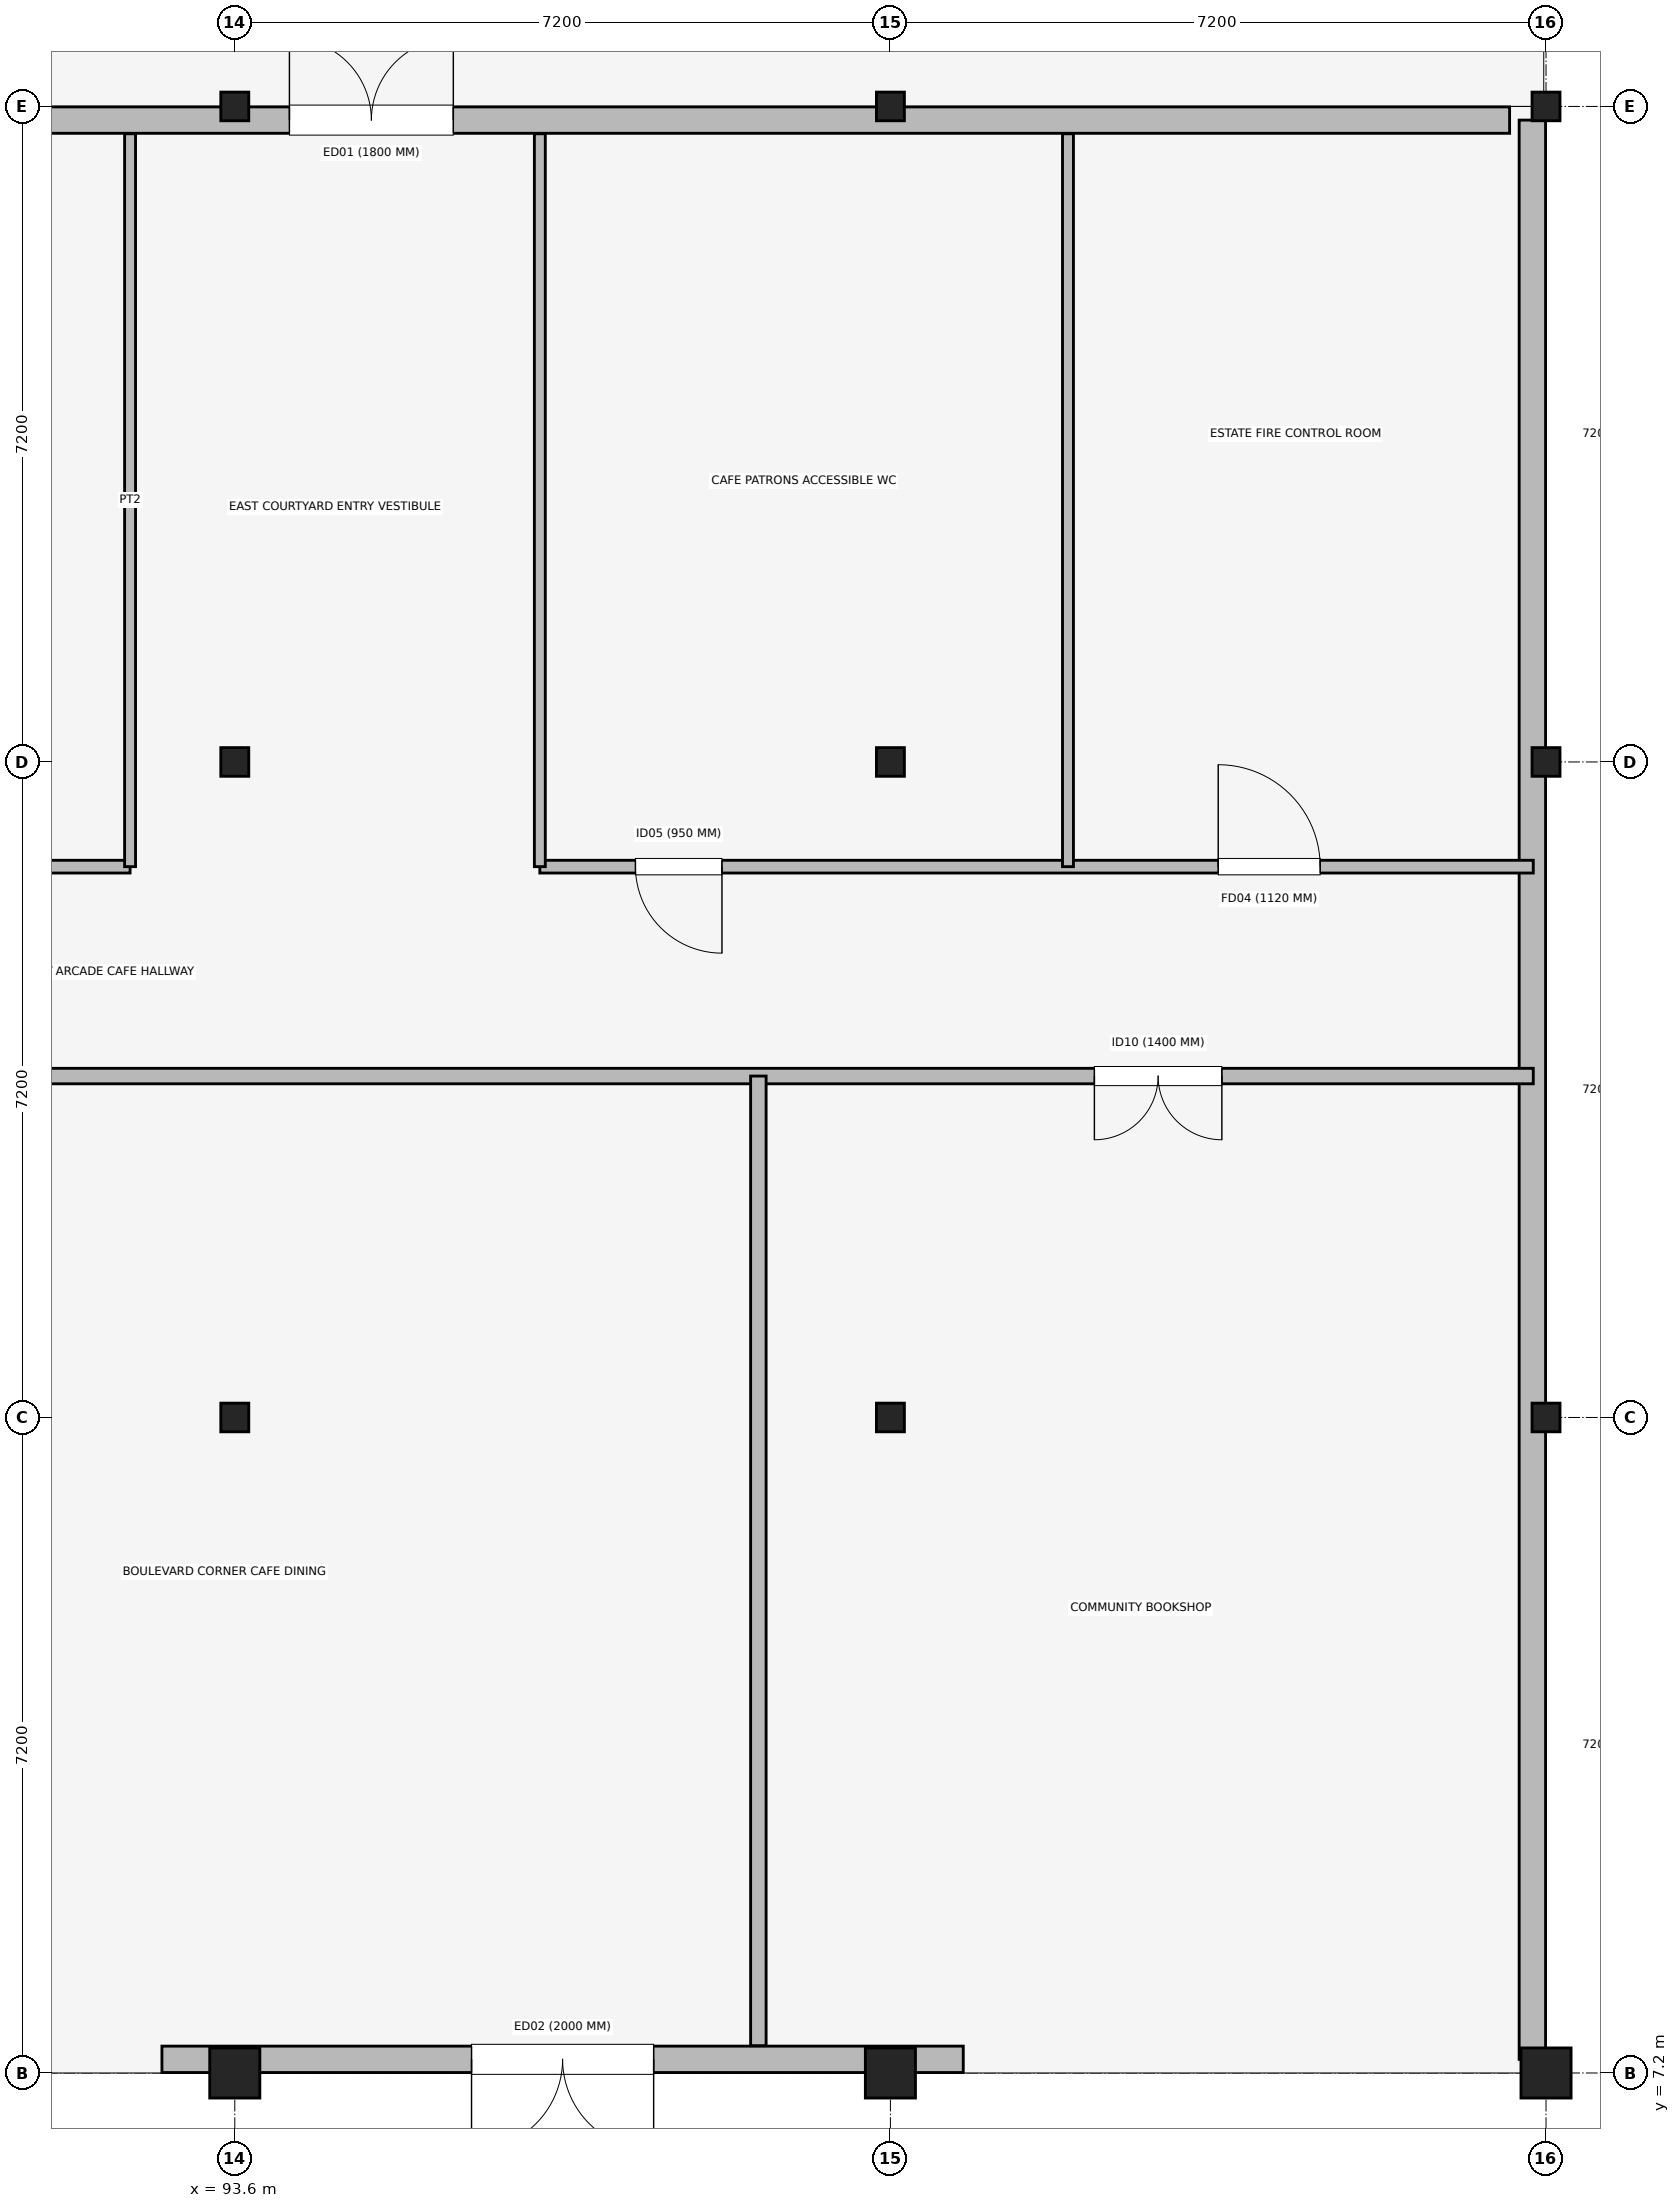
"""IFC4 building model, lengths in metres.
Left out: names, types, materials, properties, quantities, classifications, styles, units other than length and angle.
Written with IfcOpenShell. Run it as: python <this file> out.ifc"""

import sys

from ifc_helpers import new_model, si_unit, direction, frame, frame_2d, origin, origin_2d, place, context, subcontext, project, spatial, rectangle, circle, i_section, extrude, element, fill, save


model = new_model("IFC4")
c1 = context("Model", 3, precision=1e-05, world=origin(), true_north=direction((0.0, 1.0)))
c2 = subcontext(c1, "Body", "Model", "MODEL_VIEW")
j1 = project(units=[si_unit("LENGTHUNIT", "METRE"), si_unit("PLANEANGLEUNIT", "RADIAN")], contexts=[c1])
p1 = place(None, origin())
s1 = spatial("IfcSite", under=j1, at=p1, CompositionType="ELEMENT")
p2 = place(p1, origin())
s2 = spatial("IfcBuilding", under=s1, at=p2, CompositionType="ELEMENT")
p3 = place(p2, origin())
s3 = spatial("IfcBuildingStorey", under=s2, at=p3, CompositionType="ELEMENT", Elevation=0.0)
p4 = place(p3, frame((93.6, 7.2, 0.0), z_axis=(0.0, 0.0, 1.0), x_axis=(1.0, 0.0, 0.0)))
e1 = element("IfcColumn", 1, at=p4, inside=s3, PredefinedType="COLUMN", context=c2, shape_type="SweptSolid", body=[
    extrude(circle(Radius=0.275, at=origin_2d()), origin(), (0.0, 0.0, 1.0), 4.5),
])
for number, where, z_axis, x_axis in (
    (2, (93.6, 14.4, 0.0), (0.0, 0.0, 1.0), (1.0, 0.0, 0.0)),
    (3, (93.6, 21.6, 0.0), (0.0, 0.0, 1.0), (1.0, 0.0, 0.0)),
    (4, (93.6, 28.8, 0.0), (0.0, 0.0, 1.0), (1.0, 0.0, 0.0)),
):
    element("IfcColumn", number, at=place(p3, frame(where, z_axis=z_axis, x_axis=x_axis)), inside=s3, PredefinedType="COLUMN", context=c2, shape_type="SweptSolid", body=[
        extrude(i_section(OverallWidth=0.307, OverallDepth=0.315, WebThickness=0.012, FlangeThickness=0.019, FilletRadius=0.017, at=origin_2d()), origin(), (0.0, 0.0, 1.0), 4.5),
    ])
p5 = place(p3, frame((100.8, 7.2, 0.0), z_axis=(0.0, 0.0, 1.0), x_axis=(1.0, 0.0, 0.0)))
e5 = element("IfcColumn", 5, at=p5, inside=s3, PredefinedType="COLUMN", context=c2, shape_type="SweptSolid", body=[
    extrude(circle(Radius=0.275, at=origin_2d()), origin(), (0.0, 0.0, 1.0), 4.5),
])
for number, where, z_axis, x_axis in (
    (6, (100.8, 14.4, 0.0), (0.0, 0.0, 1.0), (1.0, 0.0, 0.0)),
    (7, (100.8, 21.6, 0.0), (0.0, 0.0, 1.0), (1.0, 0.0, 0.0)),
    (8, (100.8, 28.8, 0.0), (0.0, 0.0, 1.0), (1.0, 0.0, 0.0)),
):
    element("IfcColumn", number, at=place(p3, frame(where, z_axis=z_axis, x_axis=x_axis)), inside=s3, PredefinedType="COLUMN", context=c2, shape_type="SweptSolid", body=[
        extrude(i_section(OverallWidth=0.307, OverallDepth=0.315, WebThickness=0.012, FlangeThickness=0.019, FilletRadius=0.017, at=origin_2d()), origin(), (0.0, 0.0, 1.0), 4.5),
    ])
p6 = place(p3, frame((108.0, 7.2, 0.0), z_axis=(0.0, 0.0, 1.0), x_axis=(1.0, 0.0, 0.0)))
e9 = element("IfcColumn", 9, at=p6, inside=s3, PredefinedType="COLUMN", context=c2, shape_type="SweptSolid", body=[
    extrude(circle(Radius=0.275, at=origin_2d()), origin(), (0.0, 0.0, 1.0), 4.5),
])
for number, where, z_axis, x_axis in (
    (10, (108.0, 14.4, 0.0), (0.0, 0.0, 1.0), (1.0, 0.0, 0.0)),
    (11, (108.0, 21.6, 0.0), (0.0, 0.0, 1.0), (1.0, 0.0, 0.0)),
    (12, (108.0, 28.8, 0.0), (0.0, 0.0, 1.0), (1.0, 0.0, 0.0)),
):
    element("IfcColumn", number, at=place(p3, frame(where, z_axis=z_axis, x_axis=x_axis)), inside=s3, PredefinedType="COLUMN", context=c2, shape_type="SweptSolid", body=[
        extrude(i_section(OverallWidth=0.307, OverallDepth=0.315, WebThickness=0.012, FlangeThickness=0.019, FilletRadius=0.017, at=origin_2d()), origin(), (0.0, 0.0, 1.0), 4.5),
    ])
p7 = place(p3, frame((92.8, 7.35, 0.0), z_axis=(0.0, 0.0, 1.0), x_axis=(1.0, 0.0, 0.0)))
e13 = element("IfcWall", 13, at=p7, inside=s3, PredefinedType="SOLIDWALL", context=c2, shape_type="SweptSolid", body=[
    extrude(rectangle(XDim=8.8, YDim=0.29, at=frame_2d((4.4, 0.0))), origin(), (0.0, 0.0, 1.0), 2.752),
])
p8 = place(p7, frame((5.4, 0.0, 0.0), z_axis=(0.0, 0.0, 1.0), x_axis=(-1.0, 0.0, 0.0)))
e14 = element("IfcOpeningElement", 14, at=p8, cuts=e13, PredefinedType="OPENING", context=c2, shape_type="SweptSolid", body=[
    extrude(rectangle(XDim=2.0, YDim=2.5, at=frame_2d((1.0, 1.25))), frame((0.0, 0.155, 0.0), z_axis=(0.0, -1.0, 0.0), x_axis=(1.0, 0.0, 0.0)), (0.0, 0.0, 1.0), 0.31),
])
p9 = place(p3, frame((86.8, 28.65, 0.0), z_axis=(0.0, 0.0, 1.0), x_axis=(1.0, 0.0, 0.0)))
e15 = element("IfcWall", 15, at=p9, inside=s3, PredefinedType="SOLIDWALL", context=c2, shape_type="SweptSolid", body=[
    extrude(rectangle(XDim=20.8, YDim=0.29, at=frame_2d((10.4, 0.0))), origin(), (0.0, 0.0, 1.0), 3.701),
])
p10 = place(p9, frame((7.4, 0.0, 0.0)))
e16 = element("IfcOpeningElement", 16, at=p10, cuts=e15, PredefinedType="OPENING", context=c2, shape_type="SweptSolid", body=[
    extrude(rectangle(XDim=1.8, YDim=2.4, at=frame_2d((0.9, 1.2))), frame((0.0, 0.155, 0.0), z_axis=(0.0, -1.0, 0.0), x_axis=(1.0, 0.0, 0.0)), (0.0, 0.0, 1.0), 0.31),
])
p11 = place(p3, frame((107.85, 7.35, 0.0), z_axis=(0.0, 0.0, 1.0), x_axis=(0.0, 1.0, 0.0)))
e17 = element("IfcWall", 17, at=p11, inside=s3, PredefinedType="SOLIDWALL", context=c2, shape_type="SweptSolid", body=[
    extrude(rectangle(XDim=21.3, YDim=0.29, at=frame_2d((10.65, 0.0))), origin(), (0.0, 0.0, 1.0), 2.752),
])
p12 = place(p3, frame((86.54, 18.15, 0.0), z_axis=(0.0, 0.0, 1.0), x_axis=(1.0, 0.0, 0.0)))
e18 = element("IfcWall", 18, at=p12, inside=s3, PredefinedType="PARTITIONING", context=c2, shape_type="SweptSolid", body=[
    extrude(rectangle(XDim=21.32, YDim=0.17, at=frame_2d((10.66, 0.0))), origin(), (0.0, 0.0, 1.0), 3.5),
])
p13 = place(p12, frame((3.9, 0.0, 0.0), z_axis=(0.0, 0.0, 1.0), x_axis=(-1.0, 0.0, 0.0)))
e19 = element("IfcOpeningElement", 19, at=p13, cuts=e18, PredefinedType="OPENING", context=c2, shape_type="SweptSolid", body=[
    extrude(rectangle(XDim=1.5, YDim=2.28, at=frame_2d((0.75, 1.14))), frame((0.0, 0.095, 0.0), z_axis=(0.0, -1.0, 0.0), x_axis=(1.0, 0.0, 0.0)), (0.0, 0.0, 1.0), 0.19),
])
p14 = place(p12, frame((17.9, 0.0, 0.0), z_axis=(0.0, 0.0, 1.0), x_axis=(-1.0, 0.0, 0.0)))
e20 = element("IfcOpeningElement", 20, at=p14, cuts=e18, PredefinedType="OPENING", context=c2, shape_type="SweptSolid", body=[
    extrude(rectangle(XDim=1.4, YDim=2.22, at=frame_2d((0.7, 1.11))), frame((0.0, 0.095, 0.0), z_axis=(0.0, -1.0, 0.0), x_axis=(1.0, 0.0, 0.0)), (0.0, 0.0, 1.0), 0.19),
])
p15 = place(p3, frame((99.35, 7.5, 0.0), z_axis=(0.0, 0.0, 1.0), x_axis=(0.0, 1.0, 0.0)))
e21 = element("IfcWall", 21, at=p15, inside=s3, PredefinedType="PARTITIONING", context=c2, shape_type="SweptSolid", body=[
    extrude(rectangle(XDim=10.65, YDim=0.17, at=frame_2d((5.325, 0.0))), origin(), (0.0, 0.0, 1.0), 3.5),
])
p16 = place(p3, frame((86.54, 20.45, 0.0), z_axis=(0.0, 0.0, 1.0), x_axis=(1.0, 0.0, 0.0)))
e22 = element("IfcWall", 22, at=p16, inside=s3, PredefinedType="PARTITIONING", context=c2, shape_type="SweptSolid", body=[
    extrude(rectangle(XDim=5.91, YDim=0.14, at=frame_2d((2.955, 0.0))), origin(), (0.0, 0.0, 1.0), 3.5),
])
p17 = place(p16, frame((2.1, 0.0, 0.0)))
e23 = element("IfcOpeningElement", 23, at=p17, cuts=e22, PredefinedType="OPENING", context=c2, shape_type="SweptSolid", body=[
    extrude(rectangle(XDim=1.1, YDim=2.15, at=frame_2d((0.55, 1.075))), frame((0.0, 0.08, 0.0), z_axis=(0.0, -1.0, 0.0), x_axis=(1.0, 0.0, 0.0)), (0.0, 0.0, 1.0), 0.16),
])
p18 = place(p3, frame((96.95, 20.45, 0.0), z_axis=(0.0, 0.0, 1.0), x_axis=(1.0, 0.0, 0.0)))
e24 = element("IfcWall", 24, at=p18, inside=s3, PredefinedType="PARTITIONING", context=c2, shape_type="SweptSolid", body=[
    extrude(rectangle(XDim=10.91, YDim=0.14, at=frame_2d((5.455, 0.0))), origin(), (0.0, 0.0, 1.0), 3.5),
])
p19 = place(p18, frame((2.0, 0.0, 0.0), z_axis=(0.0, 0.0, 1.0), x_axis=(-1.0, 0.0, 0.0)))
e25 = element("IfcOpeningElement", 25, at=p19, cuts=e24, PredefinedType="OPENING", context=c2, shape_type="SweptSolid", body=[
    extrude(rectangle(XDim=0.95, YDim=2.12, at=frame_2d((0.475, 1.06))), frame((0.0, 0.08, 0.0), z_axis=(0.0, -1.0, 0.0), x_axis=(1.0, 0.0, 0.0)), (0.0, 0.0, 1.0), 0.16),
])
p20 = place(p18, frame((7.45, 0.0, 0.0)))
e26 = element("IfcOpeningElement", 26, at=p20, cuts=e24, PredefinedType="OPENING", context=c2, shape_type="SweptSolid", body=[
    extrude(rectangle(XDim=1.12, YDim=2.15, at=frame_2d((0.56, 1.075))), frame((0.0, 0.08, 0.0), z_axis=(0.0, -1.0, 0.0), x_axis=(1.0, 0.0, 0.0)), (0.0, 0.0, 1.0), 0.16),
])
for number, where, z_axis, x_axis in (
    (27, (92.45, 20.45, 0.0), (0.0, 0.0, 1.0), (0.0, 1.0, 0.0)),
    (28, (96.95, 20.45, 0.0), (0.0, 0.0, 1.0), (0.0, 1.0, 0.0)),
    (29, (102.75, 20.45, 0.0), (0.0, 0.0, 1.0), (0.0, 1.0, 0.0)),
):
    element("IfcWall", number, at=place(p3, frame(where, z_axis=z_axis, x_axis=x_axis)), inside=s3, PredefinedType="PARTITIONING", context=c2, shape_type="SweptSolid", body=[
        extrude(rectangle(XDim=8.05, YDim=0.12, at=frame_2d((4.025, 0.0))), origin(), (0.0, 0.0, 1.0), 3.5),
    ])
p21 = place(p8, origin())
e30 = element("IfcDoor", 30, at=p21, inside=s3, OperationType="DOUBLE_DOOR_SINGLE_SWING", PredefinedType="DOOR", context=c2, shape_type="SweptSolid", body=[
    extrude(rectangle(XDim=2.0, YDim=2.5, at=frame_2d((1.0, 1.25))), frame((0.0, 0.025, 0.0), z_axis=(0.0, -1.0, 0.0), x_axis=(1.0, 0.0, 0.0)), (0.0, 0.0, 1.0), 0.05),
])
fill(e14, e30)
p22 = place(p10, origin())
e31 = element("IfcDoor", 31, at=p22, inside=s3, OperationType="DOUBLE_DOOR_SINGLE_SWING", PredefinedType="DOOR", context=c2, shape_type="SweptSolid", body=[
    extrude(rectangle(XDim=1.8, YDim=2.4, at=frame_2d((0.9, 1.2))), frame((0.0, 0.025, 0.0), z_axis=(0.0, -1.0, 0.0), x_axis=(1.0, 0.0, 0.0)), (0.0, 0.0, 1.0), 0.05),
])
fill(e16, e31)
p23 = place(p14, origin())
e32 = element("IfcDoor", 32, at=p23, inside=s3, OperationType="DOUBLE_DOOR_SINGLE_SWING", PredefinedType="DOOR", context=c2, shape_type="SweptSolid", body=[
    extrude(rectangle(XDim=1.4, YDim=2.22, at=frame_2d((0.7, 1.11))), frame((0.0, 0.025, 0.0), z_axis=(0.0, -1.0, 0.0), x_axis=(1.0, 0.0, 0.0)), (0.0, 0.0, 1.0), 0.05),
])
fill(e20, e32)
p24 = place(p19, origin())
e33 = element("IfcDoor", 33, at=p24, inside=s3, OperationType="SINGLE_SWING_RIGHT", PredefinedType="DOOR", context=c2, shape_type="SweptSolid", body=[
    extrude(rectangle(XDim=0.95, YDim=2.12, at=frame_2d((0.475, 1.06))), frame((0.0, 0.025, 0.0), z_axis=(0.0, -1.0, 0.0), x_axis=(1.0, 0.0, 0.0)), (0.0, 0.0, 1.0), 0.05),
])
fill(e25, e33)
p25 = place(p20, origin())
e34 = element("IfcDoor", 34, at=p25, inside=s3, OperationType="SINGLE_SWING_LEFT", PredefinedType="DOOR", context=c2, shape_type="SweptSolid", body=[
    extrude(rectangle(XDim=1.12, YDim=2.15, at=frame_2d((0.56, 1.075))), frame((0.0, 0.025, 0.0), z_axis=(0.0, -1.0, 0.0), x_axis=(1.0, 0.0, 0.0)), (0.0, 0.0, 1.0), 0.05),
])
fill(e26, e34)
save(model, sys.argv[1])
